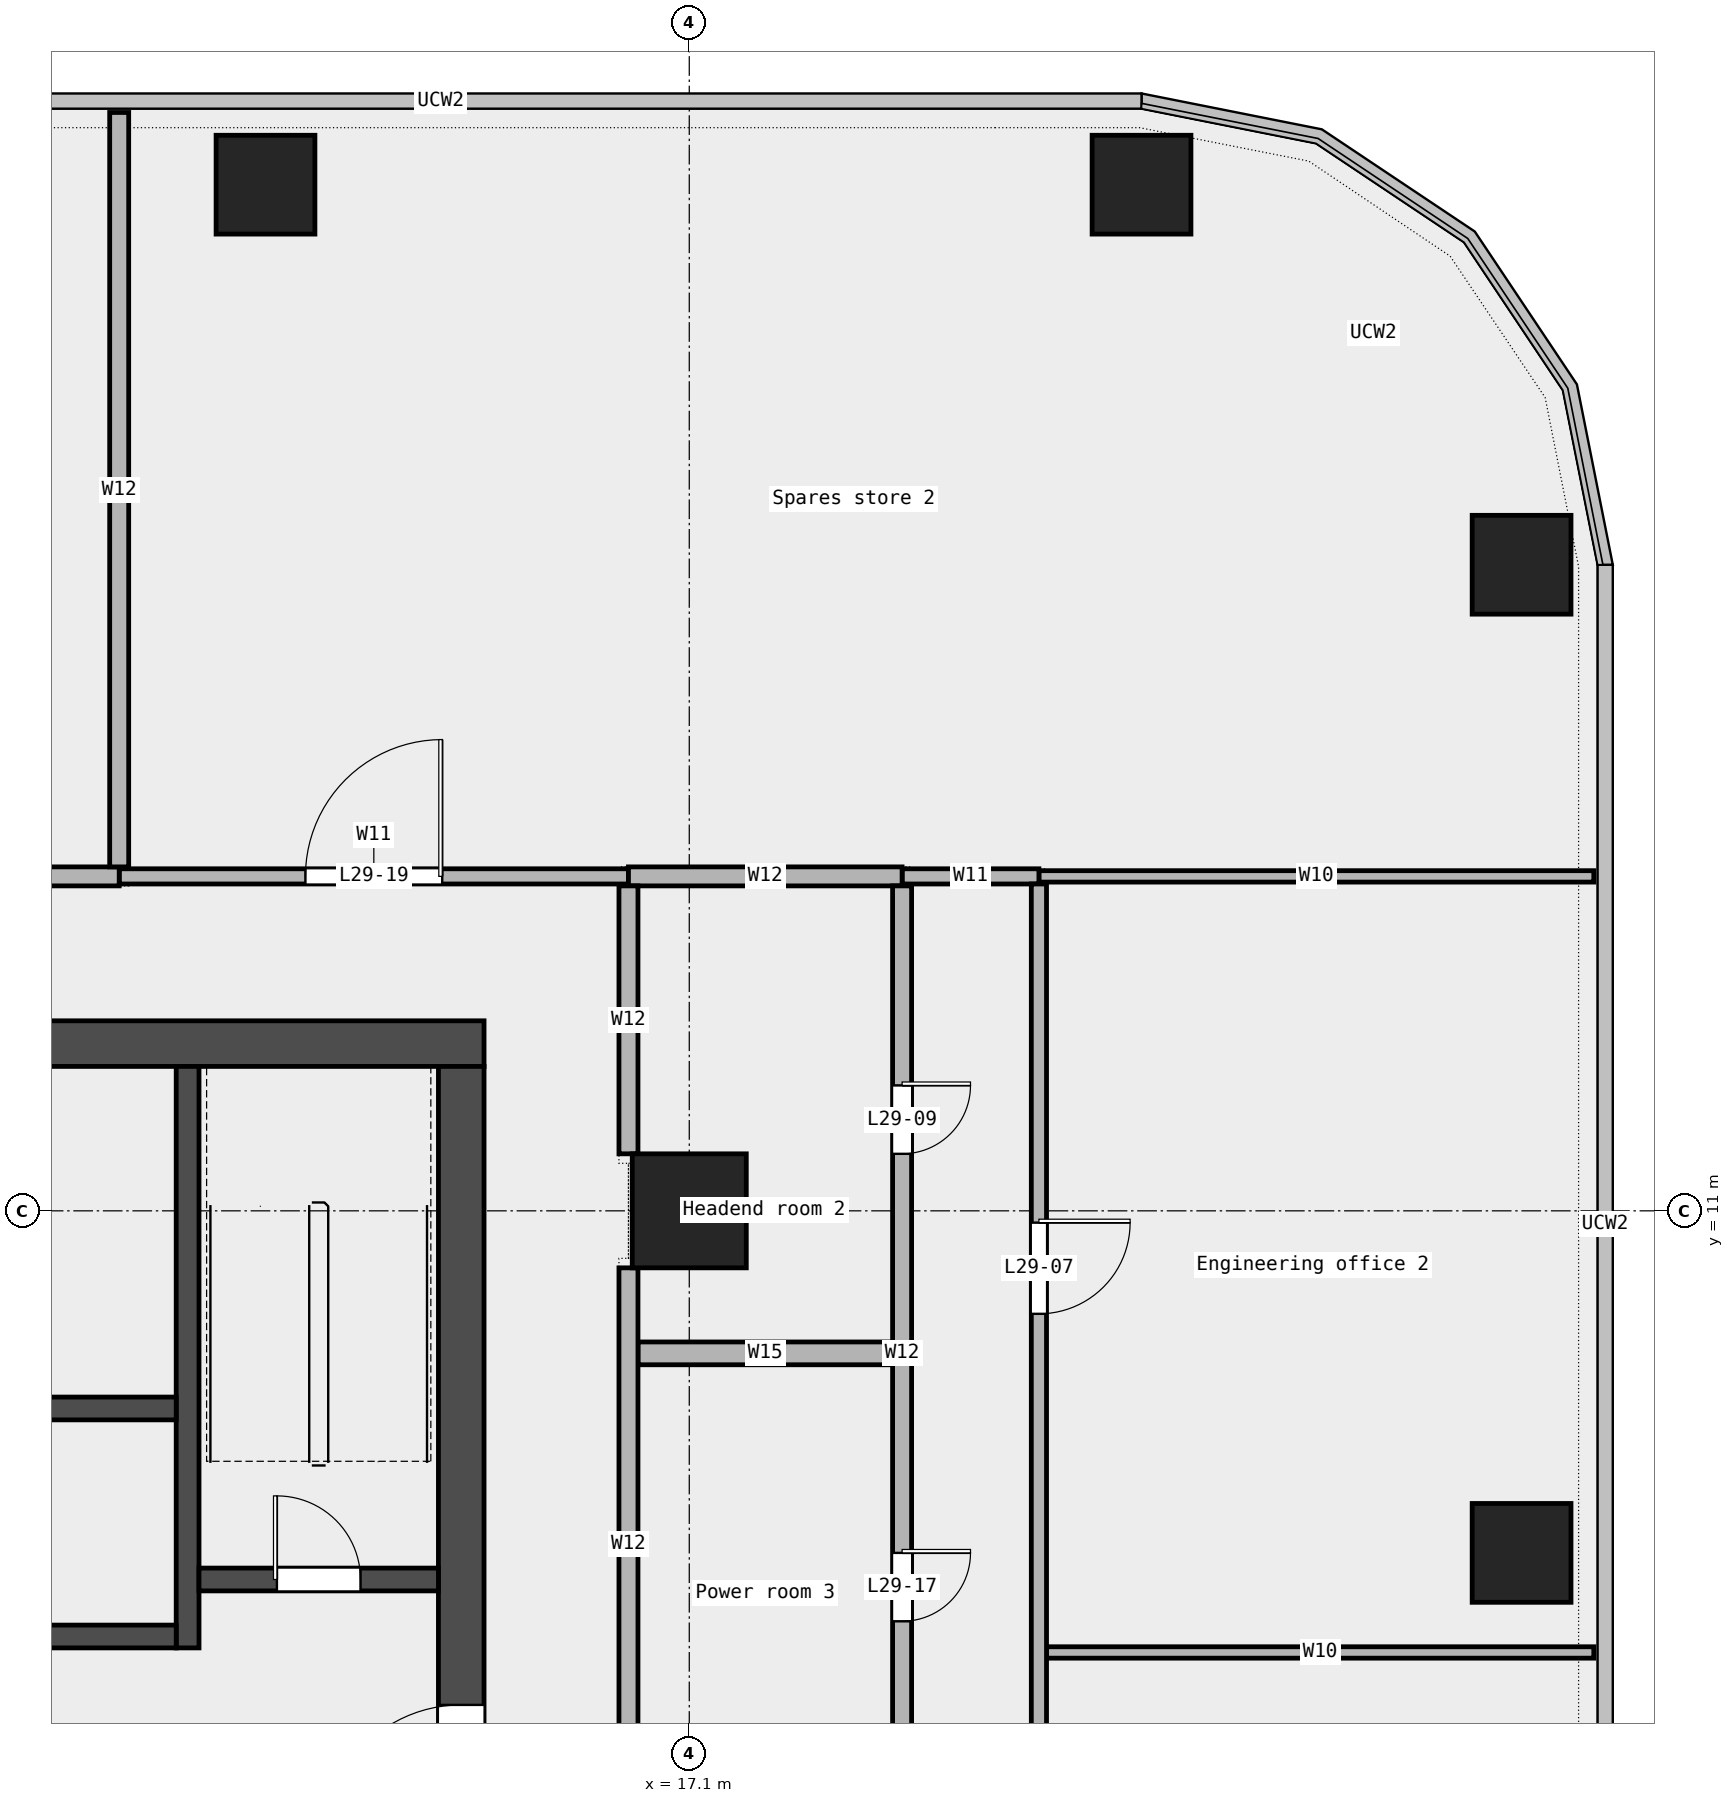
"""IFC4 building model, lengths in metres.
Left out: names, types, materials, properties, quantities, classifications, styles, units other than length and angle.
Written with IfcOpenShell. Run it as: python <this file> out.ifc"""

import sys

from ifc_helpers import new_model, si_unit, direction, frame, frame_2d, origin, origin_2d, place, context, subcontext, project, spatial, rectangle, extrude, element, fill, save


model = new_model("IFC4")
c1 = context("Model", 3, precision=1e-05, world=origin(), true_north=direction((0.0, 1.0)))
c2 = subcontext(c1, "Body", "Model", "MODEL_VIEW")
j1 = project(units=[si_unit("LENGTHUNIT", "METRE"), si_unit("PLANEANGLEUNIT", "RADIAN")], contexts=[c1])
p1 = place(None, origin())
s1 = spatial("IfcSite", under=j1, at=p1, CompositionType="ELEMENT")
p2 = place(p1, origin())
s2 = spatial("IfcBuilding", under=s1, at=p2, CompositionType="ELEMENT")
p3 = place(p2, frame((0.0, 0.0, 144.1)))
s3 = spatial("IfcBuildingStorey", under=s2, at=p3, CompositionType="ELEMENT", Elevation=144.1)
for number, where, z_axis, x_axis in (
    (1, (28.05, 6.5, 0.0), (0.0, 0.0, 1.0), (1.0, 0.0, 0.0)),
    (2, (28.05, 19.5, 0.0), (0.0, 0.0, 1.0), (1.0, 0.0, 0.0)),
    (3, (23.05, 24.5, 0.0), (0.0, 0.0, 1.0), (1.0, 0.0, 0.0)),
    (4, (11.525, 24.5, 0.0), (0.0, 0.0, 1.0), (1.0, 0.0, 0.0)),
):
    element("IfcColumn", number, at=place(p3, frame(where, z_axis=z_axis, x_axis=x_axis)), inside=s3, PredefinedType="COLUMN", context=c2, shape_type="SweptSolid", body=[
        extrude(rectangle(XDim=1.3, YDim=1.3, at=origin_2d()), origin(), (0.0, 0.0, 1.0), 3.9),
    ])
p4 = place(p3, frame((17.1, 11.0, 0.0), z_axis=(0.0, 0.0, 1.0), x_axis=(1.0, 0.0, 0.0)))
e5 = element("IfcColumn", 5, at=p4, inside=s3, PredefinedType="COLUMN", context=c2, shape_type="SweptSolid", body=[
    extrude(rectangle(XDim=1.5, YDim=1.5, at=origin_2d()), origin(), (0.0, 0.0, 1.0), 3.9),
])
p5 = place(p3, frame((21.8, 5.19, 0.0), z_axis=(0.0, 0.0, 1.0), x_axis=(1.0, 0.0, 0.0)))
e6 = element("IfcWall", 6, at=p5, inside=s3, PredefinedType="PARTITIONING", context=c2, shape_type="SweptSolid", body=[
    extrude(rectangle(XDim=7.2, YDim=0.15, at=frame_2d((3.6, 0.0))), origin(), (0.0, 0.0, 1.0), 3.9),
])
p6 = place(p3, frame((16.425, 9.125, 0.0), z_axis=(0.0, 0.0, 1.0), x_axis=(1.0, 0.0, 0.0)))
e7 = element("IfcWall", 7, at=p6, inside=s3, PredefinedType="PARTITIONING", context=c2, shape_type="SweptSolid", body=[
    extrude(rectangle(XDim=3.35, YDim=0.3, at=frame_2d((1.675, 0.0))), origin(), (0.0, 0.0, 1.0), 3.9),
])
p7 = place(p3, frame((21.7, 15.4, 0.0), z_axis=(0.0, 0.0, 1.0), x_axis=(1.0, 0.0, 0.0)))
e8 = element("IfcWall", 8, at=p7, inside=s3, PredefinedType="PARTITIONING", context=c2, shape_type="SweptSolid", body=[
    extrude(rectangle(XDim=7.3, YDim=0.15, at=frame_2d((3.65, 0.0))), origin(), (0.0, 0.0, 1.0), 3.9),
])
p8 = place(p3, frame((9.6, 15.4, 0.0), z_axis=(0.0, 0.0, 1.0), x_axis=(1.0, 0.0, 0.0)))
e9 = element("IfcWall", 9, at=p8, inside=s3, PredefinedType="PARTITIONING", context=c2, shape_type="SweptSolid", body=[
    extrude(rectangle(XDim=6.7, YDim=0.2, at=frame_2d((3.35, 0.0))), origin(), (0.0, 0.0, 1.0), 3.9),
])
p9 = place(p8, frame((2.45, 0.0, 0.0)))
e10 = element("IfcOpeningElement", 10, at=p9, cuts=e9, PredefinedType="OPENING", context=c2, shape_type="SweptSolid", body=[
    extrude(rectangle(XDim=1.8, YDim=2.1, at=frame_2d((0.9, 1.05))), frame((0.0, 0.112, 0.0), z_axis=(0.0, -1.0, 0.0), x_axis=(1.0, 0.0, 0.0)), (0.0, 0.0, 1.0), 0.224),
])
p10 = place(p3, frame((19.9, 15.4, 0.0), z_axis=(0.0, 0.0, 1.0), x_axis=(1.0, 0.0, 0.0)))
e11 = element("IfcWall", 11, at=p10, inside=s3, PredefinedType="PARTITIONING", context=c2, shape_type="SweptSolid", body=[
    extrude(rectangle(XDim=1.8, YDim=0.2, at=frame_2d((0.9, 0.0))), origin(), (0.0, 0.0, 1.0), 3.9),
])
p11 = place(p3, frame((4.61, 15.4, 0.0), z_axis=(0.0, 0.0, 1.0), x_axis=(1.0, 0.0, 0.0)))
e12 = element("IfcWall", 12, at=p11, inside=s3, PredefinedType="PARTITIONING", context=c2, shape_type="SweptSolid", body=[
    extrude(rectangle(XDim=4.99, YDim=0.25, at=frame_2d((2.495, 0.0))), origin(), (0.0, 0.0, 1.0), 3.9),
])
p12 = place(p11, frame((1.895, 0.0, 0.0)))
e13 = element("IfcOpeningElement", 13, at=p12, cuts=e12, PredefinedType="OPENING", context=c2, shape_type="SweptSolid", body=[
    extrude(rectangle(XDim=1.2, YDim=2.1, at=frame_2d((0.6, 1.05))), frame((0.0, 0.137, 0.0), z_axis=(0.0, -1.0, 0.0), x_axis=(1.0, 0.0, 0.0)), (0.0, 0.0, 1.0), 0.274),
])
p13 = place(p3, frame((16.3, 15.4, 0.0), z_axis=(0.0, 0.0, 1.0), x_axis=(1.0, 0.0, 0.0)))
e14 = element("IfcWall", 14, at=p13, inside=s3, PredefinedType="PARTITIONING", context=c2, shape_type="SweptSolid", body=[
    extrude(rectangle(XDim=3.6, YDim=0.25, at=frame_2d((1.8, 0.0))), origin(), (0.0, 0.0, 1.0), 3.9),
])
p14 = place(p3, frame((9.6, 15.525, 0.0), z_axis=(0.0, 0.0, 1.0), x_axis=(0.0, 1.0, 0.0)))
e15 = element("IfcWall", 15, at=p14, inside=s3, PredefinedType="PARTITIONING", context=c2, shape_type="SweptSolid", body=[
    extrude(rectangle(XDim=9.925, YDim=0.25, at=frame_2d((4.962, 0.0))), origin(), (0.0, 0.0, 1.0), 3.9),
])
p15 = place(p3, frame((16.3, 2.975, 0.0), z_axis=(0.0, 0.0, 1.0), x_axis=(0.0, 1.0, 0.0)))
e16 = element("IfcWall", 16, at=p15, inside=s3, PredefinedType="PARTITIONING", context=c2, shape_type="SweptSolid", body=[
    extrude(rectangle(XDim=7.275, YDim=0.25, at=frame_2d((3.637, 0.0))), origin(), (0.0, 0.0, 1.0), 3.9),
])
p16 = place(p3, frame((16.3, 11.75, 0.0), z_axis=(0.0, 0.0, 1.0), x_axis=(0.0, 1.0, 0.0)))
e17 = element("IfcWall", 17, at=p16, inside=s3, PredefinedType="PARTITIONING", context=c2, shape_type="SweptSolid", body=[
    extrude(rectangle(XDim=3.525, YDim=0.25, at=frame_2d((1.762, 0.0))), origin(), (0.0, 0.0, 1.0), 3.9),
])
p17 = place(p3, frame((19.9, 2.975, 0.0), z_axis=(0.0, 0.0, 1.0), x_axis=(0.0, 1.0, 0.0)))
e18 = element("IfcWall", 18, at=p17, inside=s3, PredefinedType="PARTITIONING", context=c2, shape_type="SweptSolid", body=[
    extrude(rectangle(XDim=12.3, YDim=0.25, at=frame_2d((6.15, 0.0))), origin(), (0.0, 0.0, 1.0), 3.9),
])
p18 = place(p17, frame((8.775, 0.0, 0.0)))
e19 = element("IfcOpeningElement", 19, at=p18, cuts=e18, PredefinedType="OPENING", context=c2, shape_type="SweptSolid", body=[
    extrude(rectangle(XDim=0.9, YDim=2.1, at=frame_2d((0.45, 1.05))), frame((0.0, 0.137, 0.0), z_axis=(0.0, -1.0, 0.0), x_axis=(1.0, 0.0, 0.0)), (0.0, 0.0, 1.0), 0.274),
])
p19 = place(p17, frame((2.625, 0.0, 0.0)))
e20 = element("IfcOpeningElement", 20, at=p19, cuts=e18, PredefinedType="OPENING", context=c2, shape_type="SweptSolid", body=[
    extrude(rectangle(XDim=0.9, YDim=2.1, at=frame_2d((0.45, 1.05))), frame((0.0, 0.137, 0.0), z_axis=(0.0, -1.0, 0.0), x_axis=(1.0, 0.0, 0.0)), (0.0, 0.0, 1.0), 0.274),
])
p20 = place(p3, frame((21.7, -9.0, 0.0), z_axis=(0.0, 0.0, 1.0), x_axis=(0.0, 1.0, 0.0)))
e21 = element("IfcWall", 21, at=p20, inside=s3, PredefinedType="PARTITIONING", context=c2, shape_type="SweptSolid", body=[
    extrude(rectangle(XDim=24.3, YDim=0.2, at=frame_2d((12.15, 0.0))), origin(), (0.0, 0.0, 1.0), 3.9),
])
p21 = place(p20, frame((18.645, 0.0, 0.0)))
e22 = element("IfcOpeningElement", 22, at=p21, cuts=e21, PredefinedType="OPENING", context=c2, shape_type="SweptSolid", body=[
    extrude(rectangle(XDim=1.2, YDim=2.1, at=frame_2d((0.6, 1.05))), frame((0.0, 0.112, 0.0), z_axis=(0.0, -1.0, 0.0), x_axis=(1.0, 0.0, 0.0)), (0.0, 0.0, 1.0), 0.224),
])
p22 = place(p20, frame((4.833, 0.0, 0.0)))
e23 = element("IfcOpeningElement", 23, at=p22, cuts=e21, PredefinedType="OPENING", context=c2, shape_type="SweptSolid", body=[
    extrude(rectangle(XDim=1.5, YDim=2.1, at=frame_2d((0.75, 1.05))), frame((0.0, 0.112, 0.0), z_axis=(0.0, -1.0, 0.0), x_axis=(1.0, 0.0, 0.0)), (0.0, 0.0, 1.0), 0.224),
])
p23 = place(p20, frame((12.228, 0.0, 0.0)))
e24 = element("IfcOpeningElement", 24, at=p23, cuts=e21, PredefinedType="OPENING", context=c2, shape_type="SweptSolid", body=[
    extrude(rectangle(XDim=0.9, YDim=2.1, at=frame_2d((0.45, 1.05))), frame((0.0, 0.112, 0.0), z_axis=(0.0, -1.0, 0.0), x_axis=(1.0, 0.0, 0.0)), (0.0, 0.0, 1.0), 0.224),
])
p24 = place(p3, frame((-14.4, 13.2, 0.0), z_axis=(0.0, 0.0, 1.0), x_axis=(1.0, 0.0, 0.0)))
e25 = element("IfcWall", 25, at=p24, inside=s3, PredefinedType="SHEAR", context=c2, shape_type="SweptSolid", body=[
    extrude(rectangle(XDim=28.8, YDim=0.6, at=frame_2d((14.4, 0.0))), origin(), (0.0, 0.0, 1.0), 4.2),
])
p25 = place(p24, frame((6.775, 0.0, 0.0)))
e26 = element("IfcOpeningElement", 26, at=p25, cuts=e25, PredefinedType="OPENING", context=c2, shape_type="SweptSolid", body=[
    extrude(rectangle(XDim=1.0, YDim=2.1, at=frame_2d((0.5, 1.05))), frame((0.0, 0.312, 0.0), z_axis=(0.0, -1.0, 0.0), x_axis=(1.0, 0.0, 0.0)), (0.0, 0.0, 1.0), 0.624),
])
p26 = place(p24, frame((13.525, 0.0, 0.0)))
e27 = element("IfcOpeningElement", 27, at=p26, cuts=e25, PredefinedType="OPENING", context=c2, shape_type="SweptSolid", body=[
    extrude(rectangle(XDim=1.0, YDim=2.1, at=frame_2d((0.5, 1.05))), frame((0.0, 0.312, 0.0), z_axis=(0.0, -1.0, 0.0), x_axis=(1.0, 0.0, 0.0)), (0.0, 0.0, 1.0), 0.624),
])
p27 = place(p24, frame((20.65, 0.0, 0.0)))
e28 = element("IfcOpeningElement", 28, at=p27, cuts=e25, PredefinedType="OPENING", context=c2, shape_type="SweptSolid", body=[
    extrude(rectangle(XDim=1.0, YDim=2.1, at=frame_2d((0.5, 1.05))), frame((0.0, 0.312, 0.0), z_axis=(0.0, -1.0, 0.0), x_axis=(1.0, 0.0, 0.0)), (0.0, 0.0, 1.0), 0.624),
])
p28 = place(p3, frame((14.1, -6.6, 0.0), z_axis=(0.0, 0.0, 1.0), x_axis=(0.0, 1.0, 0.0)))
e29 = element("IfcWall", 29, at=p28, inside=s3, PredefinedType="SHEAR", context=c2, shape_type="SweptSolid", body=[
    extrude(rectangle(XDim=19.5, YDim=0.6, at=frame_2d((9.75, 0.0))), origin(), (0.0, 0.0, 1.0), 4.2),
])
p29 = place(p28, frame((9.3, 0.0, 0.0)))
e30 = element("IfcOpeningElement", 30, at=p29, cuts=e29, PredefinedType="OPENING", context=c2, shape_type="SweptSolid", body=[
    extrude(rectangle(XDim=1.8, YDim=2.1, at=frame_2d((0.9, 1.05))), frame((0.0, 0.312, 0.0), z_axis=(0.0, -1.0, 0.0), x_axis=(1.0, 0.0, 0.0)), (0.0, 0.0, 1.0), 0.624),
])
p30 = place(p3, frame((10.5, 5.25, 0.0), z_axis=(0.0, 0.0, 1.0), x_axis=(0.0, 1.0, 0.0)))
e31 = element("IfcWall", 31, at=p30, inside=s3, PredefinedType="SHEAR", context=c2, shape_type="SweptSolid", body=[
    extrude(rectangle(XDim=7.65, YDim=0.3, at=frame_2d((3.825, 0.0))), origin(), (0.0, 0.0, 1.0), 4.2),
])
p31 = place(p3, frame((10.65, 6.15, 0.0), z_axis=(0.0, 0.0, 1.0), x_axis=(1.0, 0.0, 0.0)))
e32 = element("IfcWall", 32, at=p31, inside=s3, PredefinedType="SOLIDWALL", context=c2, shape_type="SweptSolid", body=[
    extrude(rectangle(XDim=3.15, YDim=0.3, at=frame_2d((1.575, 0.0))), origin(), (0.0, 0.0, 1.0), 4.2),
])
p32 = place(p31, frame((1.025, 0.0, 0.0)))
e33 = element("IfcOpeningElement", 33, at=p32, cuts=e32, PredefinedType="OPENING", context=c2, shape_type="SweptSolid", body=[
    extrude(rectangle(XDim=1.1, YDim=2.1, at=frame_2d((0.55, 1.05))), frame((0.0, 0.162, 0.0), z_axis=(0.0, -1.0, 0.0), x_axis=(1.0, 0.0, 0.0)), (0.0, 0.0, 1.0), 0.324),
])
p33 = place(p3, frame((-10.35, 5.4, 0.0), z_axis=(0.0, 0.0, 1.0), x_axis=(1.0, 0.0, 0.0)))
e34 = element("IfcWall", 34, at=p33, inside=s3, PredefinedType="SOLIDWALL", context=c2, shape_type="SweptSolid", body=[
    extrude(rectangle(XDim=20.7, YDim=0.3, at=frame_2d((10.35, 0.0))), origin(), (0.0, 0.0, 1.0), 4.2),
])
p34 = place(p33, frame((0.512, 0.0, 0.0)))
e35 = element("IfcOpeningElement", 35, at=p34, cuts=e34, PredefinedType="OPENING", context=c2, shape_type="SweptSolid", body=[
    extrude(rectangle(XDim=1.3, YDim=2.1, at=frame_2d((0.65, 1.05))), frame((0.0, 0.162, 0.0), z_axis=(0.0, -1.0, 0.0), x_axis=(1.0, 0.0, 0.0)), (0.0, 0.0, 1.0), 0.324),
])
p35 = place(p3, frame((-10.35, 8.4, 0.0), z_axis=(0.0, 0.0, 1.0), x_axis=(1.0, 0.0, 0.0)))
e36 = element("IfcWall", 36, at=p35, inside=s3, PredefinedType="SOLIDWALL", context=c2, shape_type="SweptSolid", body=[
    extrude(rectangle(XDim=20.7, YDim=0.3, at=frame_2d((10.35, 0.0))), origin(), (0.0, 0.0, 1.0), 4.2),
])
p36 = place(p21, origin())
e37 = element("IfcDoor", 37, at=p36, inside=s3, OperationType="SINGLE_SWING_LEFT", PredefinedType="DOOR", context=c2, shape_type="SweptSolid", body=[
    extrude(rectangle(XDim=1.2, YDim=2.1, at=frame_2d((0.6, 1.05))), frame((0.0, 0.025, 0.0), z_axis=(0.0, -1.0, 0.0), x_axis=(1.0, 0.0, 0.0)), (0.0, 0.0, 1.0), 0.05),
])
fill(e22, e37)
p37 = place(p18, origin())
e38 = element("IfcDoor", 38, at=p37, inside=s3, OperationType="SINGLE_SWING_LEFT", PredefinedType="DOOR", context=c2, shape_type="SweptSolid", body=[
    extrude(rectangle(XDim=0.9, YDim=2.1, at=frame_2d((0.45, 1.05))), frame((0.0, 0.025, 0.0), z_axis=(0.0, -1.0, 0.0), x_axis=(1.0, 0.0, 0.0)), (0.0, 0.0, 1.0), 0.05),
])
fill(e19, e38)
p38 = place(p19, origin())
e39 = element("IfcDoor", 39, at=p38, inside=s3, OperationType="SINGLE_SWING_LEFT", PredefinedType="DOOR", context=c2, shape_type="SweptSolid", body=[
    extrude(rectangle(XDim=0.9, YDim=2.1, at=frame_2d((0.45, 1.05))), frame((0.0, 0.025, 0.0), z_axis=(0.0, -1.0, 0.0), x_axis=(1.0, 0.0, 0.0)), (0.0, 0.0, 1.0), 0.05),
])
fill(e20, e39)
p39 = place(p9, origin())
e40 = element("IfcDoor", 40, at=p39, inside=s3, OperationType="DOUBLE_DOOR_SINGLE_SWING", PredefinedType="DOOR", context=c2, shape_type="SweptSolid", body=[
    extrude(rectangle(XDim=1.8, YDim=2.1, at=frame_2d((0.9, 1.05))), frame((0.0, 0.025, 0.0), z_axis=(0.0, -1.0, 0.0), x_axis=(1.0, 0.0, 0.0)), (0.0, 0.0, 1.0), 0.05),
])
fill(e10, e40)
p40 = place(p32, origin())
e41 = element("IfcDoor", 41, at=p40, inside=s3, OperationType="SINGLE_SWING_RIGHT", PredefinedType="DOOR", context=c2, shape_type="SweptSolid", body=[
    extrude(rectangle(XDim=1.1, YDim=2.1, at=frame_2d((0.55, 1.05))), frame((0.0, 0.025, 0.0), z_axis=(0.0, -1.0, 0.0), x_axis=(1.0, 0.0, 0.0)), (0.0, 0.0, 1.0), 0.05),
])
fill(e33, e41)
p41 = place(p29, origin())
e42 = element("IfcDoor", 42, at=p41, inside=s3, OperationType="DOUBLE_DOOR_SINGLE_SWING", PredefinedType="DOOR", context=c2, shape_type="SweptSolid", body=[
    extrude(rectangle(XDim=1.8, YDim=2.1, at=frame_2d((0.9, 1.05))), frame((0.0, 0.025, 0.0), z_axis=(0.0, -1.0, 0.0), x_axis=(1.0, 0.0, 0.0)), (0.0, 0.0, 1.0), 0.05),
])
fill(e30, e42)
save(model, sys.argv[1])
